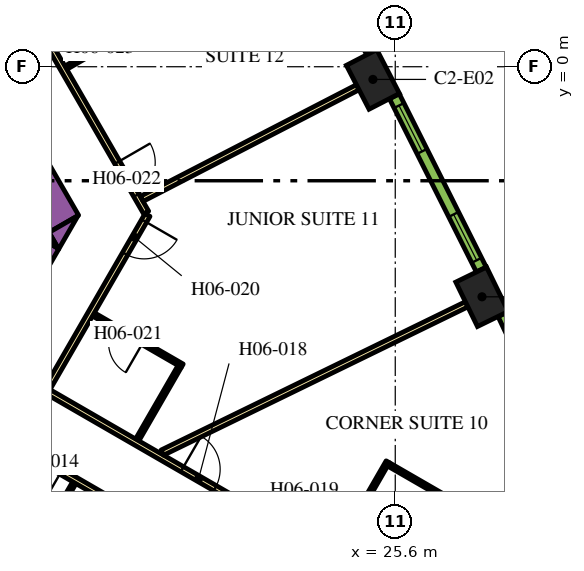
"""IFC4 building model, lengths in metres.
Left out: names, types, materials, properties, quantities, classifications, styles, units other than length and angle.
Written with IfcOpenShell. Run it as: python <this file> out.ifc"""

import sys

from ifc_helpers import new_model, si_unit, direction, frame, frame_2d, origin, origin_2d, place, context, subcontext, project, spatial, polyline, rectangle, outline, extrude, element, fill, save


model = new_model("IFC4")
c1 = context("Model", 3, precision=1e-05, world=origin(), true_north=direction((0.0, 1.0)))
c2 = subcontext(c1, "Body", "Model", "MODEL_VIEW")
j1 = project(units=[si_unit("LENGTHUNIT", "METRE"), si_unit("PLANEANGLEUNIT", "RADIAN")], contexts=[c1])
p1 = place(None, origin())
s1 = spatial("IfcSite", under=j1, at=p1, CompositionType="ELEMENT")
p2 = place(p1, origin())
s2 = spatial("IfcBuilding", under=s1, at=p2, CompositionType="ELEMENT")
p3 = place(p2, frame((0.0, 0.0, 83.7)))
s3 = spatial("IfcBuildingStorey", under=s2, at=p3, CompositionType="ELEMENT", Elevation=83.7)
for number, where, z_axis, x_axis in (
    (1, (27.883, -6.054, 0.0), (0.0, 0.0, 1.0), (-0.438, 0.899, 0.0)),
    (2, (25.012, -0.334, 0.0), (0.0, 0.0, 1.0), (-0.459, 0.888, 0.0)),
):
    element("IfcColumn", number, at=place(p3, frame(where, z_axis=z_axis, x_axis=x_axis)), inside=s3, PredefinedType="COLUMN", context=c2, shape_type="SweptSolid", body=[
        extrude(rectangle(XDim=1.3, YDim=0.9, at=origin_2d()), origin(), (0.0, 0.0, 1.0), 3.9),
    ])
p4 = place(p3, frame((6.776, 13.364, 0.0), z_axis=(0.0, 0.0, 1.0), x_axis=(0.500004177138, -0.8660229921, 0.0)))
e3 = element("IfcWall", 3, at=p4, inside=s3, PredefinedType="SOLIDWALL", context=c2, shape_type="SweptSolid", body=[
    extrude(rectangle(XDim=20.204, YDim=0.9, at=frame_2d((10.102, 0.0))), origin(), (0.0, 0.0, 1.0), 3.9),
])
p5 = place(p3, origin())
e4 = element("IfcWall", 4, at=p5, inside=s3, PredefinedType="SOLIDWALL", context=c2, shape_type="SweptSolid", body=[
    extrude(outline(polyline([(16.743, -4.8), (16.489, -4.36), (17.251, -3.92), (16.743, -4.8)])), origin(), (0.0, 0.0, 1.0), 3.9),
])
p6 = place(p3, frame((11.695, -12.644, 0.0), z_axis=(0.0, 0.0, 1.0), x_axis=(0.500010229568, 0.86601949766, 0.0)))
e5 = element("IfcWall", 5, at=p6, inside=s3, PredefinedType="SOLIDWALL", context=c2, shape_type="SweptSolid", body=[
    extrude(rectangle(XDim=9.326, YDim=0.9, at=frame_2d((4.663, 0.0))), origin(), (0.0, 0.0, 1.0), 3.9),
])
e6 = element("IfcWall", 6, at=p5, inside=s3, PredefinedType="SOLIDWALL", context=c2, shape_type="SweptSolid", body=[
    extrude(outline(polyline([(16.223, -3.9), (16.732, -4.78), (15.969, -4.34), (16.223, -3.9)])), origin(), (0.0, 0.0, 1.0), 3.9),
])
p7 = place(p3, frame((16.412, -8.523, 0.0), z_axis=(0.0, 0.0, 1.0), x_axis=(0.866025629663, -0.499999608766, 0.0)))
e7 = element("IfcWall", 7, at=p7, inside=s3, PredefinedType="PARTITIONING", context=c2, shape_type="SweptSolid", body=[
    extrude(rectangle(XDim=13.624, YDim=0.15, at=frame_2d((6.812, 0.0))), origin(), (0.0, 0.0, 1.0), 2.75),
])
p8 = place(p7, frame((4.134, 0.0, 0.0)))
e8 = element("IfcOpeningElement", 8, at=p8, cuts=e7, PredefinedType="OPENING", context=c2, shape_type="SweptSolid", body=[
    extrude(rectangle(XDim=1.0, YDim=2.1, at=frame_2d((0.5, 1.05))), frame((0.0, 0.085, 0.0), z_axis=(0.0, -1.0, 0.0), x_axis=(1.0, 0.0, 0.0)), (0.0, 0.0, 1.0), 0.17),
])
p9 = place(p3, frame((19.081, -3.9, 0.0), z_axis=(0.0, 0.0, 1.0), x_axis=(-0.499974327079, -0.866040225545, 0.0)))
e9 = element("IfcWall", 9, at=p9, inside=s3, PredefinedType="PARTITIONING", context=c2, shape_type="SweptSolid", body=[
    extrude(rectangle(XDim=5.258, YDim=0.15, at=frame_2d((2.629, 0.0))), origin(), (0.0, 0.0, 1.0), 2.75),
])
p10 = place(p9, frame((0.18, 0.0, 0.0)))
e10 = element("IfcOpeningElement", 10, at=p10, cuts=e9, PredefinedType="OPENING", context=c2, shape_type="SweptSolid", body=[
    extrude(rectangle(XDim=1.0, YDim=2.1, at=frame_2d((0.5, 1.05))), frame((0.0, 0.085, 0.0), z_axis=(0.0, -1.0, 0.0), x_axis=(1.0, 0.0, 0.0)), (0.0, 0.0, 1.0), 0.17),
])
p11 = place(p3, frame((6.163, 18.475, 0.0), z_axis=(0.0, 0.0, 1.0), x_axis=(0.500001317485, -0.866024643133, 0.0)))
e11 = element("IfcWall", 11, at=p11, inside=s3, PredefinedType="PARTITIONING", context=c2, shape_type="SweptSolid", body=[
    extrude(rectangle(XDim=25.767, YDim=0.15, at=frame_2d((12.883, 0.0))), origin(), (0.0, 0.0, 1.0), 2.75),
])
p12 = place(p11, frame((24.241, 0.0, 0.0)))
e12 = element("IfcOpeningElement", 12, at=p12, cuts=e11, PredefinedType="OPENING", context=c2, shape_type="SweptSolid", body=[
    extrude(rectangle(XDim=1.0, YDim=2.1, at=frame_2d((0.5, 1.05))), frame((0.0, 0.085, 0.0), z_axis=(0.0, -1.0, 0.0), x_axis=(1.0, 0.0, 0.0)), (0.0, 0.0, 1.0), 0.17),
])
p13 = place(p11, frame((13.144, 0.0, 0.0)))
e13 = element("IfcOpeningElement", 13, at=p13, cuts=e11, PredefinedType="OPENING", context=c2, shape_type="SweptSolid", body=[
    extrude(rectangle(XDim=1.0, YDim=2.1, at=frame_2d((0.5, 1.05))), frame((0.0, 0.085, 0.0), z_axis=(0.0, -1.0, 0.0), x_axis=(1.0, 0.0, 0.0)), (0.0, 0.0, 1.0), 0.17),
])
p14 = place(p11, frame((10.874, 0.0, 0.0)))
e14 = element("IfcOpeningElement", 14, at=p14, cuts=e11, PredefinedType="OPENING", context=c2, shape_type="SweptSolid", body=[
    extrude(rectangle(XDim=0.9, YDim=2.1, at=frame_2d((0.45, 1.05))), frame((0.0, 0.085, 0.0), z_axis=(0.0, -1.0, 0.0), x_axis=(1.0, 0.0, 0.0)), (0.0, 0.0, 1.0), 0.17),
])
p15 = place(p11, frame((3.718, 0.0, 0.0)))
e15 = element("IfcOpeningElement", 15, at=p15, cuts=e11, PredefinedType="OPENING", context=c2, shape_type="SweptSolid", body=[
    extrude(rectangle(XDim=1.1, YDim=2.1, at=frame_2d((0.55, 1.05))), frame((0.0, 0.085, 0.0), z_axis=(0.0, -1.0, 0.0), x_axis=(1.0, 0.0, 0.0)), (0.0, 0.0, 1.0), 0.17),
])
p16 = place(p11, frame((2.411, 0.0, 0.0)))
e16 = element("IfcOpeningElement", 16, at=p16, cuts=e11, PredefinedType="OPENING", context=c2, shape_type="SweptSolid", body=[
    extrude(rectangle(XDim=1.0, YDim=2.1, at=frame_2d((0.5, 1.05))), frame((0.0, 0.085, 0.0), z_axis=(0.0, -1.0, 0.0), x_axis=(1.0, 0.0, 0.0)), (0.0, 0.0, 1.0), 0.17),
])
p17 = place(p3, frame((27.386, -16.764, 0.0), z_axis=(0.0, 0.0, 1.0), x_axis=(-0.866022585856, 0.500004880763, 0.0)))
e17 = element("IfcWall", 17, at=p17, inside=s3, PredefinedType="PARTITIONING", context=c2, shape_type="SweptSolid", body=[
    extrude(rectangle(XDim=13.544, YDim=0.15, at=frame_2d((6.772, 0.0))), origin(), (0.0, 0.0, 1.0), 2.75),
])
p18 = place(p17, frame((12.214, 0.0, 0.0)))
e18 = element("IfcOpeningElement", 18, at=p18, cuts=e17, PredefinedType="OPENING", context=c2, shape_type="SweptSolid", body=[
    extrude(rectangle(XDim=1.0, YDim=2.1, at=frame_2d((0.5, 1.05))), frame((0.0, 0.085, 0.0), z_axis=(0.0, -1.0, 0.0), x_axis=(1.0, 0.0, 0.0)), (0.0, 0.0, 1.0), 0.17),
])
p19 = place(p17, frame((8.49, 0.0, 0.0)))
e19 = element("IfcOpeningElement", 19, at=p19, cuts=e17, PredefinedType="OPENING", context=c2, shape_type="SweptSolid", body=[
    extrude(rectangle(XDim=1.0, YDim=2.1, at=frame_2d((0.5, 1.05))), frame((0.0, 0.085, 0.0), z_axis=(0.0, -1.0, 0.0), x_axis=(1.0, 0.0, 0.0)), (0.0, 0.0, 1.0), 0.17),
])
p20 = place(p3, frame((24.613, -0.541, 0.0), z_axis=(0.0, 0.0, 1.0), x_axis=(-0.888459912519, -0.458954228487, 0.0)))
e20 = element("IfcWall", 20, at=p20, inside=s3, PredefinedType="PARTITIONING", context=c2, shape_type="SweptSolid", body=[
    extrude(rectangle(XDim=6.392, YDim=0.15, at=frame_2d((3.196, 0.0))), origin(), (0.0, 0.0, 1.0), 2.75),
])
p21 = place(p3, frame((27.479, -6.251, 0.0), z_axis=(0.0, 0.0, 1.0), x_axis=(-0.898945877276, -0.438059710231, 0.0)))
e21 = element("IfcWall", 21, at=p21, inside=s3, PredefinedType="PARTITIONING", context=c2, shape_type="SweptSolid", body=[
    extrude(rectangle(XDim=8.909, YDim=0.15, at=frame_2d((4.455, 0.0))), origin(), (0.0, 0.0, 1.0), 2.75),
])
p22 = place(p3, frame((17.155, -10.944, 0.0), z_axis=(0.0, 0.0, 1.0), x_axis=(-0.499939757307, -0.866060182126, 0.0)))
e22 = element("IfcWall", 22, at=p22, inside=s3, PredefinedType="PARTITIONING", context=c2, shape_type="SweptSolid", body=[
    extrude(rectangle(XDim=2.95, YDim=0.1, at=frame_2d((1.475, 0.0))), origin(), (0.0, 0.0, 1.0), 2.75),
])
p23 = place(p22, frame((0.6, 0.0, 0.0)))
e23 = element("IfcOpeningElement", 23, at=p23, cuts=e22, PredefinedType="OPENING", context=c2, shape_type="SweptSolid", body=[
    extrude(rectangle(XDim=0.9, YDim=2.1, at=frame_2d((0.45, 1.05))), frame((0.0, 0.06, 0.0), z_axis=(0.0, -1.0, 0.0), x_axis=(1.0, 0.0, 0.0)), (0.0, 0.0, 1.0), 0.12),
])
p24 = place(p3, frame((25.404, -10.395, 0.0), z_axis=(0.0, 0.0, 1.0), x_axis=(-0.500011755427, -0.866018616679, 0.0)))
e24 = element("IfcWall", 24, at=p24, inside=s3, PredefinedType="PARTITIONING", context=c2, shape_type="SweptSolid", body=[
    extrude(rectangle(XDim=2.8, YDim=0.1, at=frame_2d((1.4, 0.0))), origin(), (0.0, 0.0, 1.0), 2.75),
])
p25 = place(p24, frame((1.3, 0.0, 0.0)))
e25 = element("IfcOpeningElement", 25, at=p25, cuts=e24, PredefinedType="OPENING", context=c2, shape_type="SweptSolid", body=[
    extrude(rectangle(XDim=0.9, YDim=2.1, at=frame_2d((0.45, 1.05))), frame((0.0, 0.06, 0.0), z_axis=(0.0, -1.0, 0.0), x_axis=(1.0, 0.0, 0.0)), (0.0, 0.0, 1.0), 0.12),
])
p26 = place(p3, frame((25.422, -10.463, 0.0), z_axis=(0.0, 0.0, 1.0), x_axis=(0.866024647952, -0.500001309137, 0.0)))
e26 = element("IfcWall", 26, at=p26, inside=s3, PredefinedType="PARTITIONING", context=c2, shape_type="SweptSolid", body=[
    extrude(rectangle(XDim=2.4, YDim=0.1, at=frame_2d((1.2, 0.0))), origin(), (0.0, 0.0, 1.0), 2.75),
])
p27 = place(p3, frame((19.996, -7.867, 0.0), z_axis=(0.0, 0.0, 1.0), x_axis=(-0.866019956843, 0.50000943426, 0.0)))
e27 = element("IfcWall", 27, at=p27, inside=s3, PredefinedType="PARTITIONING", context=c2, shape_type="SweptSolid", body=[
    extrude(rectangle(XDim=2.7, YDim=0.1, at=frame_2d((1.35, 0.0))), origin(), (0.0, 0.0, 1.0), 2.75),
])
p28 = place(p27, frame((1.2, 0.0, 0.0)))
e28 = element("IfcOpeningElement", 28, at=p28, cuts=e27, PredefinedType="OPENING", context=c2, shape_type="SweptSolid", body=[
    extrude(rectangle(XDim=0.9, YDim=2.1, at=frame_2d((0.45, 1.05))), frame((0.0, 0.06, 0.0), z_axis=(0.0, -1.0, 0.0), x_axis=(1.0, 0.0, 0.0)), (0.0, 0.0, 1.0), 0.12),
])
p29 = place(p3, frame((19.922, -7.894, 0.0), z_axis=(0.0, 0.0, 1.0), x_axis=(-0.499995378973, -0.866028071719, 0.0)))
e29 = element("IfcWall", 29, at=p29, inside=s3, PredefinedType="PARTITIONING", context=c2, shape_type="SweptSolid", body=[
    extrude(rectangle(XDim=2.22, YDim=0.1, at=frame_2d((1.11, 0.0))), origin(), (0.0, 0.0, 1.0), 2.75),
])
p30 = place(p3, frame((16.931, -0.026, 0.0), z_axis=(0.0, 0.0, 1.0), x_axis=(0.866059108428, 0.4999416173, 0.0)))
e30 = element("IfcWall", 30, at=p30, inside=s3, PredefinedType="PARTITIONING", context=c2, shape_type="SweptSolid", body=[
    extrude(rectangle(XDim=2.7, YDim=0.1, at=frame_2d((1.35, 0.0))), origin(), (0.0, 0.0, 1.0), 2.75),
])
p31 = place(p30, frame((0.6, 0.0, 0.0)))
e31 = element("IfcOpeningElement", 31, at=p31, cuts=e30, PredefinedType="OPENING", context=c2, shape_type="SweptSolid", body=[
    extrude(rectangle(XDim=0.9, YDim=2.1, at=frame_2d((0.45, 1.05))), frame((0.0, 0.06, 0.0), z_axis=(0.0, -1.0, 0.0), x_axis=(1.0, 0.0, 0.0)), (0.0, 0.0, 1.0), 0.12),
])
p32 = place(p3, frame((30.62, -11.127, 0.0), z_axis=(0.0, 0.0, 1.0), x_axis=(-0.427543726596, 0.903994669148, 0.0)))
e32 = element("IfcWall", 32, at=p32, inside=s3, PredefinedType="SOLIDWALL", context=c2, shape_type="SweptSolid", body=[
    extrude(rectangle(XDim=5.107, YDim=0.29, at=frame_2d((2.553, 0.0))), origin(), (0.0, 0.0, 1.0), 3.65),
])
p33 = place(p32, frame((0.24, 0.0, 0.9)))
e33 = element("IfcOpeningElement", 33, at=p33, cuts=e32, PredefinedType="OPENING", context=c2, shape_type="SweptSolid", body=[
    extrude(rectangle(XDim=1.35, YDim=2.15, at=frame_2d((0.675, 1.075))), frame((0.0, 0.155, 0.0), z_axis=(0.0, -1.0, 0.0), x_axis=(1.0, 0.0, 0.0)), (0.0, 0.0, 1.0), 0.31),
])
p34 = place(p32, frame((3.471, 0.0, 0.9)))
e34 = element("IfcOpeningElement", 34, at=p34, cuts=e32, PredefinedType="OPENING", context=c2, shape_type="SweptSolid", body=[
    extrude(rectangle(XDim=1.35, YDim=2.15, at=frame_2d((0.675, 1.075))), frame((0.0, 0.155, 0.0), z_axis=(0.0, -1.0, 0.0), x_axis=(1.0, 0.0, 0.0)), (0.0, 0.0, 1.0), 0.31),
])
p35 = place(p3, frame((27.864, -5.336, 0.0), z_axis=(0.0, 0.0, 1.0), x_axis=(-0.448534297211, 0.893765620409, 0.0)))
e35 = element("IfcWall", 35, at=p35, inside=s3, PredefinedType="SOLIDWALL", context=c2, shape_type="SweptSolid", body=[
    extrude(rectangle(XDim=5.1, YDim=0.29, at=frame_2d((2.55, 0.0))), origin(), (0.0, 0.0, 1.0), 3.65),
])
p36 = place(p35, frame((0.272, 0.0, 0.9)))
e36 = element("IfcOpeningElement", 36, at=p36, cuts=e35, PredefinedType="OPENING", context=c2, shape_type="SweptSolid", body=[
    extrude(rectangle(XDim=1.35, YDim=2.15, at=frame_2d((0.675, 1.075))), frame((0.0, 0.155, 0.0), z_axis=(0.0, -1.0, 0.0), x_axis=(1.0, 0.0, 0.0)), (0.0, 0.0, 1.0), 0.31),
])
p37 = place(p35, frame((3.478, 0.0, 0.9)))
e37 = element("IfcOpeningElement", 37, at=p37, cuts=e35, PredefinedType="OPENING", context=c2, shape_type="SweptSolid", body=[
    extrude(rectangle(XDim=1.35, YDim=2.15, at=frame_2d((0.675, 1.075))), frame((0.0, 0.155, 0.0), z_axis=(0.0, -1.0, 0.0), x_axis=(1.0, 0.0, 0.0)), (0.0, 0.0, 1.0), 0.31),
])
p38 = place(p3, frame((24.977, 0.383, 0.0), z_axis=(0.0, 0.0, 1.0), x_axis=(-0.469323203119, 0.883026461106, 0.0)))
e38 = element("IfcWall", 38, at=p38, inside=s3, PredefinedType="SOLIDWALL", context=c2, shape_type="SweptSolid", body=[
    extrude(rectangle(XDim=5.101, YDim=0.29, at=frame_2d((2.55, 0.0))), origin(), (0.0, 0.0, 1.0), 3.65),
])
p39 = place(p38, frame((0.273, 0.0, 0.9)))
e39 = element("IfcOpeningElement", 39, at=p39, cuts=e38, PredefinedType="OPENING", context=c2, shape_type="SweptSolid", body=[
    extrude(rectangle(XDim=1.35, YDim=2.15, at=frame_2d((0.675, 1.075))), frame((0.0, 0.155, 0.0), z_axis=(0.0, -1.0, 0.0), x_axis=(1.0, 0.0, 0.0)), (0.0, 0.0, 1.0), 0.31),
])
p40 = place(p38, frame((3.478, 0.0, 0.9)))
e40 = element("IfcOpeningElement", 40, at=p40, cuts=e38, PredefinedType="OPENING", context=c2, shape_type="SweptSolid", body=[
    extrude(rectangle(XDim=1.35, YDim=2.15, at=frame_2d((0.675, 1.075))), frame((0.0, 0.155, 0.0), z_axis=(0.0, -1.0, 0.0), x_axis=(1.0, 0.0, 0.0)), (0.0, 0.0, 1.0), 0.31),
])
p41 = place(p18, origin())
e41 = element("IfcDoor", 41, at=p41, inside=s3, OperationType="SINGLE_SWING_RIGHT", PredefinedType="DOOR", context=c2, shape_type="SweptSolid", body=[
    extrude(rectangle(XDim=1.0, YDim=2.1, at=frame_2d((0.5, 1.05))), frame((0.0, 0.025, 0.0), z_axis=(0.0, -1.0, 0.0), x_axis=(1.0, 0.0, 0.0)), (0.0, 0.0, 1.0), 0.05),
])
fill(e18, e41)
p42 = place(p8, origin())
e42 = element("IfcDoor", 42, at=p42, inside=s3, OperationType="SINGLE_SWING_LEFT", PredefinedType="DOOR", context=c2, shape_type="SweptSolid", body=[
    extrude(rectangle(XDim=1.0, YDim=2.1, at=frame_2d((0.5, 1.05))), frame((0.0, 0.025, 0.0), z_axis=(0.0, -1.0, 0.0), x_axis=(1.0, 0.0, 0.0)), (0.0, 0.0, 1.0), 0.05),
])
fill(e8, e42)
p43 = place(p10, origin())
e43 = element("IfcDoor", 43, at=p43, inside=s3, OperationType="SINGLE_SWING_LEFT", PredefinedType="DOOR", context=c2, shape_type="SweptSolid", body=[
    extrude(rectangle(XDim=1.0, YDim=2.1, at=frame_2d((0.5, 1.05))), frame((0.0, 0.025, 0.0), z_axis=(0.0, -1.0, 0.0), x_axis=(1.0, 0.0, 0.0)), (0.0, 0.0, 1.0), 0.05),
])
fill(e10, e43)
p44 = place(p28, origin())
e44 = element("IfcDoor", 44, at=p44, inside=s3, OperationType="SINGLE_SWING_LEFT", PredefinedType="DOOR", context=c2, shape_type="SweptSolid", body=[
    extrude(rectangle(XDim=0.9, YDim=2.1, at=frame_2d((0.45, 1.05))), frame((0.0, 0.025, 0.0), z_axis=(0.0, -1.0, 0.0), x_axis=(1.0, 0.0, 0.0)), (0.0, 0.0, 1.0), 0.05),
])
fill(e28, e44)
p45 = place(p12, origin())
e45 = element("IfcDoor", 45, at=p45, inside=s3, OperationType="SINGLE_SWING_RIGHT", PredefinedType="DOOR", context=c2, shape_type="SweptSolid", body=[
    extrude(rectangle(XDim=1.0, YDim=2.1, at=frame_2d((0.5, 1.05))), frame((0.0, 0.025, 0.0), z_axis=(0.0, -1.0, 0.0), x_axis=(1.0, 0.0, 0.0)), (0.0, 0.0, 1.0), 0.05),
])
fill(e12, e45)
p46 = place(p31, origin())
e46 = element("IfcDoor", 46, at=p46, inside=s3, OperationType="SINGLE_SWING_RIGHT", PredefinedType="DOOR", context=c2, shape_type="SweptSolid", body=[
    extrude(rectangle(XDim=0.9, YDim=2.1, at=frame_2d((0.45, 1.05))), frame((0.0, 0.025, 0.0), z_axis=(0.0, -1.0, 0.0), x_axis=(1.0, 0.0, 0.0)), (0.0, 0.0, 1.0), 0.05),
])
fill(e31, e46)
p47 = place(p36, origin())
e47 = element("IfcWindow", 47, at=p47, inside=s3, PartitioningType="DOUBLE_PANEL_VERTICAL", PredefinedType="WINDOW", context=c2, shape_type="SweptSolid", body=[
    extrude(rectangle(XDim=1.35, YDim=2.15, at=frame_2d((0.675, 1.075))), frame((0.0, 0.015, 0.0), z_axis=(0.0, -1.0, 0.0), x_axis=(1.0, 0.0, 0.0)), (0.0, 0.0, 1.0), 0.06),
])
fill(e36, e47)
p48 = place(p37, origin())
e48 = element("IfcWindow", 48, at=p48, inside=s3, PartitioningType="DOUBLE_PANEL_VERTICAL", PredefinedType="WINDOW", context=c2, shape_type="SweptSolid", body=[
    extrude(rectangle(XDim=1.35, YDim=2.15, at=frame_2d((0.675, 1.075))), frame((0.0, 0.015, 0.0), z_axis=(0.0, -1.0, 0.0), x_axis=(1.0, 0.0, 0.0)), (0.0, 0.0, 1.0), 0.06),
])
fill(e37, e48)
save(model, sys.argv[1])
